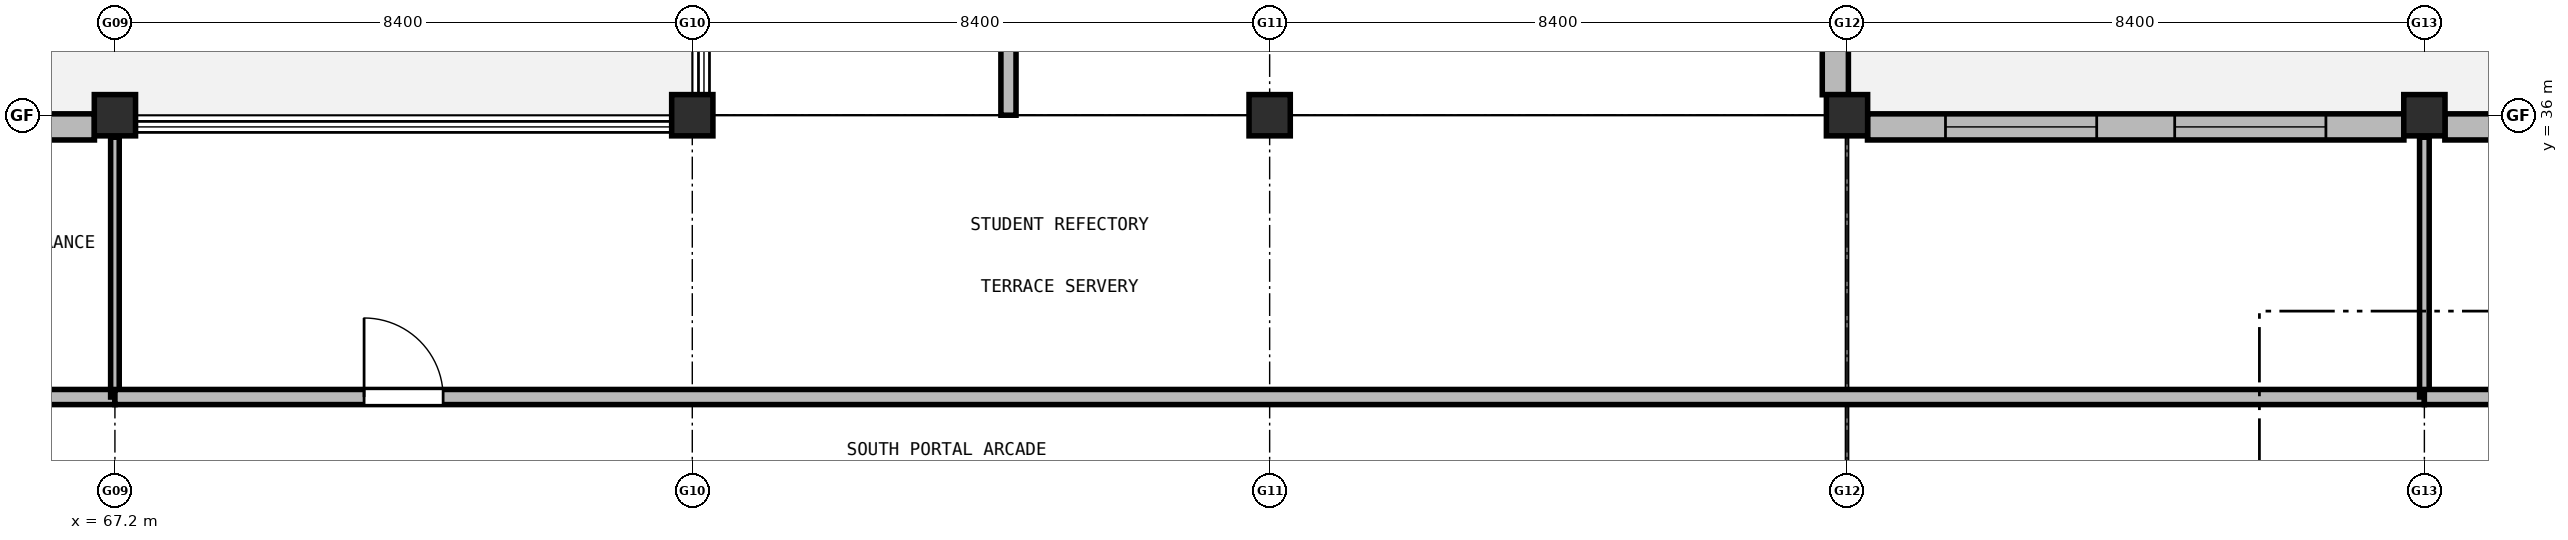
"""IFC4 building model, lengths in metres.
Left out: names, types, materials, properties, quantities, classifications, styles, units other than length and angle.
Written with IfcOpenShell. Run it as: python <this file> out.ifc"""

import sys

from ifc_helpers import new_model, si_unit, direction, frame, frame_2d, origin, origin_2d, place, context, subcontext, project, spatial, rectangle, circle, extrude, element, fill, save


model = new_model("IFC4")
c1 = context("Model", 3, precision=1e-05, world=origin(), true_north=direction((0.0, 1.0)))
c2 = subcontext(c1, "Body", "Model", "MODEL_VIEW")
j1 = project(units=[si_unit("LENGTHUNIT", "METRE"), si_unit("PLANEANGLEUNIT", "RADIAN")], contexts=[c1])
p1 = place(None, origin())
s1 = spatial("IfcSite", under=j1, at=p1, CompositionType="ELEMENT")
p2 = place(p1, origin())
s2 = spatial("IfcBuilding", under=s1, at=p2, CompositionType="ELEMENT")
p3 = place(p2, origin())
s3 = spatial("IfcBuildingStorey", under=s2, at=p3, CompositionType="ELEMENT", Elevation=0.0)
for number, where, z_axis, x_axis in (
    (1, (67.2, 36.0, 0.0), (0.0, 0.0, 1.0), (1.0, 0.0, 0.0)),
    (2, (75.6, 36.0, 0.0), (0.0, 0.0, 1.0), (1.0, 0.0, 0.0)),
    (3, (84.0, 36.0, 0.0), (0.0, 0.0, 1.0), (1.0, 0.0, 0.0)),
    (4, (92.4, 36.0, 0.0), (0.0, 0.0, 1.0), (1.0, 0.0, 0.0)),
    (5, (100.8, 36.0, 0.0), (0.0, 0.0, 1.0), (1.0, 0.0, 0.0)),
):
    element("IfcColumn", number, at=place(p3, frame(where, z_axis=z_axis, x_axis=x_axis)), inside=s3, PredefinedType="COLUMN", context=c2, shape_type="SweptSolid", body=[
        extrude(circle(Radius=0.3, at=origin_2d()), origin(), (0.0, 0.0, 1.0), 5.1),
    ])
p4 = place(p3, frame((59.098, 35.83, 0.0), z_axis=(0.0, 0.0, 1.0), x_axis=(1.0, 0.0, 0.0)))
e6 = element("IfcWall", 6, at=p4, inside=s3, PredefinedType="SOLIDWALL", context=c2, shape_type="SweptSolid", body=[
    extrude(rectangle(XDim=7.804, YDim=0.38, at=frame_2d((3.902, 0.0))), origin(), (0.0, 0.0, 1.0), 4.76),
])
p5 = place(p4, frame((2.802, 0.0, 0.0)))
e7 = element("IfcOpeningElement", 7, at=p5, cuts=e6, PredefinedType="OPENING", context=c2, shape_type="SweptSolid", body=[
    extrude(rectangle(XDim=2.2, YDim=2.4, at=frame_2d((1.1, 1.2))), frame((0.0, 0.2, 0.0), z_axis=(0.0, -1.0, 0.0), x_axis=(1.0, 0.0, 0.0)), (0.0, 0.0, 1.0), 0.4),
])
p6 = place(p3, frame((92.23, 42.827, 0.0), z_axis=(0.0, 0.0, 1.0), x_axis=(0.0, -1.0, 0.0)))
e8 = element("IfcWall", 8, at=p6, inside=s3, PredefinedType="SOLIDWALL", context=c2, shape_type="SweptSolid", body=[
    extrude(rectangle(XDim=6.529, YDim=0.38, at=frame_2d((3.264, 0.0))), origin(), (0.0, 0.0, 1.0), 4.76),
])
p7 = place(p6, frame((2.064, 0.0, 0.95)))
e9 = element("IfcOpeningElement", 9, at=p7, cuts=e8, PredefinedType="OPENING", context=c2, shape_type="SweptSolid", body=[
    extrude(rectangle(XDim=2.4, YDim=2.1, at=frame_2d((1.2, 1.05))), frame((0.0, 0.2, 0.0), z_axis=(0.0, -1.0, 0.0), x_axis=(1.0, 0.0, 0.0)), (0.0, 0.0, 1.0), 0.4),
])
p8 = place(p3, frame((92.698, 35.83, 0.0), z_axis=(0.0, 0.0, 1.0), x_axis=(1.0, 0.0, 0.0)))
e10 = element("IfcWall", 10, at=p8, inside=s3, PredefinedType="SOLIDWALL", context=c2, shape_type="SweptSolid", body=[
    extrude(rectangle(XDim=7.804, YDim=0.38, at=frame_2d((3.902, 0.0))), origin(), (0.0, 0.0, 1.0), 4.01),
])
p9 = place(p8, frame((1.135, 0.0, 0.95)))
e11 = element("IfcOpeningElement", 11, at=p9, cuts=e10, PredefinedType="OPENING", context=c2, shape_type="SweptSolid", body=[
    extrude(rectangle(XDim=2.2, YDim=2.1, at=frame_2d((1.1, 1.05))), frame((0.0, 0.2, 0.0), z_axis=(0.0, -1.0, 0.0), x_axis=(1.0, 0.0, 0.0)), (0.0, 0.0, 1.0), 0.4),
])
p10 = place(p8, frame((4.469, 0.0, 0.95)))
e12 = element("IfcOpeningElement", 12, at=p10, cuts=e10, PredefinedType="OPENING", context=c2, shape_type="SweptSolid", body=[
    extrude(rectangle(XDim=2.2, YDim=2.1, at=frame_2d((1.1, 1.05))), frame((0.0, 0.2, 0.0), z_axis=(0.0, -1.0, 0.0), x_axis=(1.0, 0.0, 0.0)), (0.0, 0.0, 1.0), 0.4),
])
p11 = place(p3, frame((101.098, 35.83, 0.0), z_axis=(0.0, 0.0, 1.0), x_axis=(1.0, 0.0, 0.0)))
e13 = element("IfcWall", 13, at=p11, inside=s3, PredefinedType="SOLIDWALL", context=c2, shape_type="SweptSolid", body=[
    extrude(rectangle(XDim=7.804, YDim=0.38, at=frame_2d((3.902, 0.0))), origin(), (0.0, 0.0, 1.0), 4.01),
])
p12 = place(p11, frame((2.902, 0.0, 0.0)))
e14 = element("IfcOpeningElement", 14, at=p12, cuts=e13, PredefinedType="OPENING", context=c2, shape_type="SweptSolid", body=[
    extrude(rectangle(XDim=2.0, YDim=2.4, at=frame_2d((1.0, 1.2))), frame((0.0, 0.2, 0.0), z_axis=(0.0, -1.0, 0.0), x_axis=(1.0, 0.0, 0.0)), (0.0, 0.0, 1.0), 0.4),
])
p13 = place(p3, frame((33.6, 31.9, 0.0), z_axis=(0.0, 0.0, 1.0), x_axis=(1.0, 0.0, 0.0)))
e15 = element("IfcWall", 15, at=p13, inside=s3, PredefinedType="SOLIDWALL", context=c2, shape_type="SweptSolid", body=[
    extrude(rectangle(XDim=33.6, YDim=0.22, at=frame_2d((16.8, 0.0))), origin(), (0.0, 0.0, 1.0), 4.105),
])
p14 = place(p13, frame((3.6, 0.0, 0.0)))
e16 = element("IfcOpeningElement", 16, at=p14, cuts=e15, PredefinedType="OPENING", context=c2, shape_type="SweptSolid", body=[
    extrude(rectangle(XDim=1.2, YDim=2.15, at=frame_2d((0.6, 1.075))), frame((0.0, 0.12, 0.0), z_axis=(0.0, -1.0, 0.0), x_axis=(1.0, 0.0, 0.0)), (0.0, 0.0, 1.0), 0.24),
])
p15 = place(p3, frame((67.2, 31.9, 0.0), z_axis=(0.0, 0.0, 1.0), x_axis=(0.0, 1.0, 0.0)))
e17 = element("IfcWall", 17, at=p15, inside=s3, PredefinedType="PARTITIONING", context=c2, shape_type="SweptSolid", body=[
    extrude(rectangle(XDim=3.78, YDim=0.125, at=frame_2d((1.89, 0.0))), origin(), (0.0, 0.0, 1.0), 4.005),
])
p16 = place(p3, frame((67.2, 31.9, 0.0), z_axis=(0.0, 0.0, 1.0), x_axis=(1.0, 0.0, 0.0)))
e18 = element("IfcWall", 18, at=p16, inside=s3, PredefinedType="SOLIDWALL", context=c2, shape_type="SweptSolid", body=[
    extrude(rectangle(XDim=33.6, YDim=0.22, at=frame_2d((16.8, 0.0))), origin(), (0.0, 0.0, 1.0), 4.105),
])
p17 = place(p16, frame((3.625, 0.0, 0.0)))
e19 = element("IfcOpeningElement", 19, at=p17, cuts=e18, PredefinedType="OPENING", context=c2, shape_type="SweptSolid", body=[
    extrude(rectangle(XDim=1.15, YDim=2.15, at=frame_2d((0.575, 1.075))), frame((0.0, 0.12, 0.0), z_axis=(0.0, -1.0, 0.0), x_axis=(1.0, 0.0, 0.0)), (0.0, 0.0, 1.0), 0.24),
])
p18 = place(p3, frame((100.8, 31.9, 0.0), z_axis=(0.0, 0.0, 1.0), x_axis=(0.0, 1.0, 0.0)))
e20 = element("IfcWall", 20, at=p18, inside=s3, PredefinedType="PARTITIONING", context=c2, shape_type="SweptSolid", body=[
    extrude(rectangle(XDim=3.78, YDim=0.14, at=frame_2d((1.89, 0.0))), origin(), (0.0, 0.0, 1.0), 4.005),
])
p19 = place(p3, frame((100.8, 31.9, 0.0), z_axis=(0.0, 0.0, 1.0), x_axis=(1.0, 0.0, 0.0)))
e21 = element("IfcWall", 21, at=p19, inside=s3, PredefinedType="SOLIDWALL", context=c2, shape_type="SweptSolid", body=[
    extrude(rectangle(XDim=25.2, YDim=0.22, at=frame_2d((12.6, 0.0))), origin(), (0.0, 0.0, 1.0), 4.105),
])
p20 = place(p19, frame((3.375, 0.0, 0.0)))
e22 = element("IfcOpeningElement", 22, at=p20, cuts=e21, PredefinedType="OPENING", context=c2, shape_type="SweptSolid", body=[
    extrude(rectangle(XDim=1.65, YDim=2.2, at=frame_2d((0.825, 1.1))), frame((0.0, 0.12, 0.0), z_axis=(0.0, -1.0, 0.0), x_axis=(1.0, 0.0, 0.0)), (0.0, 0.0, 1.0), 0.24),
])
p21 = place(p3, frame((80.2, 36.0, 0.0), z_axis=(0.0, 0.0, 1.0), x_axis=(0.0, 1.0, 0.0)))
e23 = element("IfcWall", 23, at=p21, inside=s3, PredefinedType="SOLIDWALL", context=c2, shape_type="SweptSolid", body=[
    extrude(rectangle(XDim=14.4, YDim=0.22, at=frame_2d((7.2, 0.0))), origin(), (0.0, 0.0, 1.0), 4.005),
])
p22 = place(p21, frame((6.625, 0.0, 0.0)))
e24 = element("IfcOpeningElement", 24, at=p22, cuts=e23, PredefinedType="OPENING", context=c2, shape_type="SweptSolid", body=[
    extrude(rectangle(XDim=1.15, YDim=2.15, at=frame_2d((0.575, 1.075))), frame((0.0, 0.12, 0.0), z_axis=(0.0, -1.0, 0.0), x_axis=(1.0, 0.0, 0.0)), (0.0, 0.0, 1.0), 0.24),
])
p23 = place(p9, origin())
e25 = element("IfcWindow", 25, at=p23, inside=s3, PartitioningType="SINGLE_PANEL", PredefinedType="WINDOW", context=c2, shape_type="SweptSolid", body=[
    extrude(rectangle(XDim=2.2, YDim=2.1, at=frame_2d((1.1, 1.05))), frame((0.0, 0.03, 0.0), z_axis=(0.0, -1.0, 0.0), x_axis=(1.0, 0.0, 0.0)), (0.0, 0.0, 1.0), 0.06),
])
fill(e11, e25)
p24 = place(p10, origin())
e26 = element("IfcWindow", 26, at=p24, inside=s3, PartitioningType="SINGLE_PANEL", PredefinedType="WINDOW", context=c2, shape_type="SweptSolid", body=[
    extrude(rectangle(XDim=2.2, YDim=2.1, at=frame_2d((1.1, 1.05))), frame((0.0, 0.03, 0.0), z_axis=(0.0, -1.0, 0.0), x_axis=(1.0, 0.0, 0.0)), (0.0, 0.0, 1.0), 0.06),
])
fill(e12, e26)
p25 = place(p17, origin())
e27 = element("IfcDoor", 27, at=p25, inside=s3, OperationType="SINGLE_SWING_LEFT", PredefinedType="DOOR", context=c2, shape_type="SweptSolid", body=[
    extrude(rectangle(XDim=1.15, YDim=2.15, at=frame_2d((0.575, 1.075))), frame((0.0, 0.025, 0.0), z_axis=(0.0, -1.0, 0.0), x_axis=(1.0, 0.0, 0.0)), (0.0, 0.0, 1.0), 0.05),
])
fill(e19, e27)
save(model, sys.argv[1])
